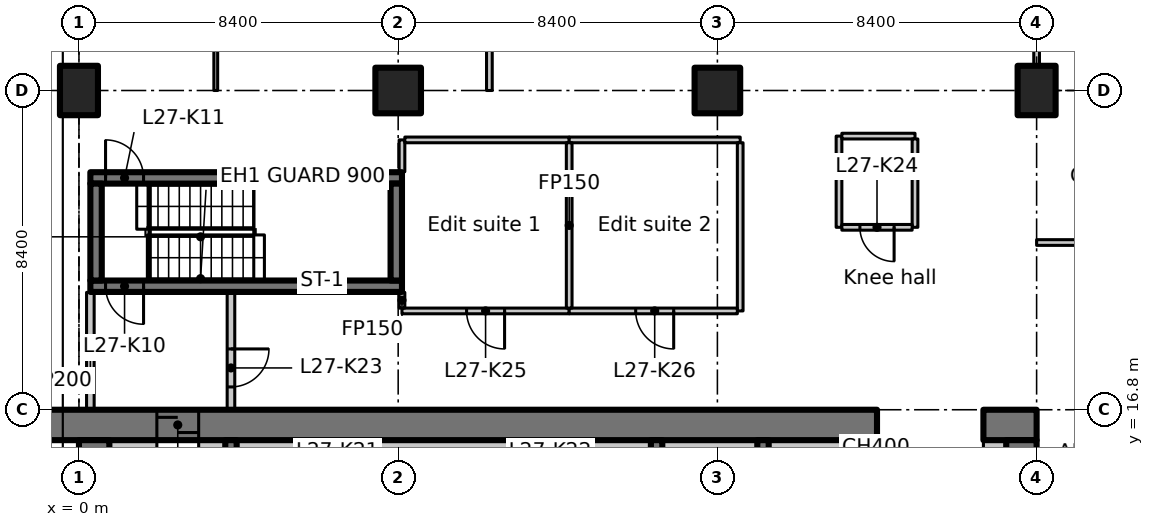
"""IFC4 building model, lengths in metres.
Left out: names, types, materials, properties, quantities, classifications, styles, units other than length and angle.
Written with IfcOpenShell. Run it as: python <this file> out.ifc"""

import sys

from ifc_helpers import new_model, si_unit, direction, frame, frame_2d, origin, origin_2d, place, context, subcontext, project, spatial, polyline, rectangle, outline, extrude, element, fill, save


model = new_model("IFC4")
c1 = context("Model", 3, precision=1e-05, world=origin(), true_north=direction((0.0, 1.0)))
c2 = subcontext(c1, "Body", "Model", "MODEL_VIEW")
j1 = project(units=[si_unit("LENGTHUNIT", "METRE"), si_unit("PLANEANGLEUNIT", "RADIAN")], contexts=[c1])
p1 = place(None, origin())
s1 = spatial("IfcSite", under=j1, at=p1, CompositionType="ELEMENT")
p2 = place(p1, origin())
s2 = spatial("IfcBuilding", under=s1, at=p2, CompositionType="ELEMENT")
p3 = place(p2, frame((0.0, 0.0, 113.3)))
s3 = spatial("IfcBuildingStorey", under=s2, at=p3, CompositionType="ELEMENT", Elevation=113.3)
p4 = place(p3, frame((0.0, 25.2, 0.0), z_axis=(0.0, 0.0, 1.0), x_axis=(1.0, 0.0, 0.0)))
e1 = element("IfcColumn", 1, at=p4, inside=s3, PredefinedType="COLUMN", context=c2, shape_type="SweptSolid", body=[
    extrude(rectangle(XDim=1.0, YDim=1.3, at=origin_2d()), origin(), (0.0, 0.0, 1.0), 3.35),
])
for number, where, z_axis, x_axis in (
    (2, (8.4, 25.2, 0.0), (0.0, 0.0, 1.0), (1.0, 0.0, 0.0)),
    (3, (16.8, 25.2, 0.0), (0.0, 0.0, 1.0), (1.0, 0.0, 0.0)),
):
    element("IfcColumn", number, at=place(p3, frame(where, z_axis=z_axis, x_axis=x_axis)), inside=s3, PredefinedType="COLUMN", context=c2, shape_type="SweptSolid", body=[
        extrude(rectangle(XDim=1.2, YDim=1.2, at=origin_2d()), origin(), (0.0, 0.0, 1.0), 3.35),
    ])
p5 = place(p3, frame((25.2, 25.2, 0.0), z_axis=(0.0, 0.0, 1.0), x_axis=(1.0, 0.0, 0.0)))
e4 = element("IfcColumn", 4, at=p5, inside=s3, PredefinedType="COLUMN", context=c2, shape_type="SweptSolid", body=[
    extrude(rectangle(XDim=1.0, YDim=1.3, at=origin_2d()), origin(), (0.0, 0.0, 1.0), 3.35),
])
p6 = place(p3, frame((-1.1, 16.4, 0.0), z_axis=(0.0, 0.0, 1.0), x_axis=(1.0, 0.0, 0.0)))
e5 = element("IfcWall", 5, at=p6, inside=s3, PredefinedType="SHEAR", context=c2, shape_type="SweptSolid", body=[
    extrude(rectangle(XDim=22.1, YDim=0.8, at=frame_2d((11.05, 0.0))), origin(), (0.0, 0.0, 1.0), 3.35),
])
p7 = place(p6, frame((3.15, 0.0, 0.0)))
e6 = element("IfcOpeningElement", 6, at=p7, cuts=e5, PredefinedType="OPENING", context=c2, shape_type="SweptSolid", body=[
    extrude(rectangle(XDim=1.1, YDim=2.3, at=frame_2d((0.55, 1.15))), frame((0.0, 0.41, 0.0), z_axis=(0.0, -1.0, 0.0), x_axis=(1.0, 0.0, 0.0)), (0.0, 0.0, 1.0), 0.82),
])
p8 = place(p3, frame((23.8, 16.4, 0.0), z_axis=(0.0, 0.0, 1.0), x_axis=(1.0, 0.0, 0.0)))
e7 = element("IfcWall", 7, at=p8, inside=s3, PredefinedType="SHEAR", context=c2, shape_type="SweptSolid", body=[
    extrude(rectangle(XDim=1.4, YDim=0.8, at=frame_2d((0.7, 0.0))), origin(), (0.0, 0.0, 1.0), 3.35),
])
p9 = place(p3, frame((0.4, 7.136, 0.0), z_axis=(0.0, 0.0, 1.0), x_axis=(0.0, 1.0, 0.0)))
e8 = element("IfcWall", 8, at=p9, inside=s3, PredefinedType="SHEAR", context=c2, shape_type="SweptSolid", body=[
    extrude(rectangle(XDim=8.864, YDim=0.8, at=frame_2d((4.432, 0.0))), origin(), (0.0, 0.0, 1.0), 3.35),
])
p10 = place(p3, frame((24.8, 12.6, 0.0), z_axis=(0.0, 0.0, 1.0), x_axis=(0.0, 1.0, 0.0)))
e9 = element("IfcWall", 9, at=p10, inside=s3, PredefinedType="SHEAR", context=c2, shape_type="SweptSolid", body=[
    extrude(rectangle(XDim=3.4, YDim=0.8, at=frame_2d((1.7, 0.0))), origin(), (0.0, 0.0, 1.0), 3.35),
])
p11 = place(p3, frame((0.8, 15.8, 0.0), z_axis=(0.0, 0.0, 1.0), x_axis=(1.0, 0.0, 0.0)))
e10 = element("IfcWall", 10, at=p11, inside=s3, PredefinedType="PARTITIONING", context=c2, shape_type="SweptSolid", body=[
    extrude(rectangle(XDim=1.25, YDim=0.4, at=frame_2d((0.625, 0.0))), origin(), (0.0, 0.0, 1.0), 3.35),
])
p12 = place(p3, frame((23.8, 15.8, 0.0), z_axis=(0.0, 0.0, 1.0), x_axis=(1.0, 0.0, 0.0)))
e11 = element("IfcWall", 11, at=p12, inside=s3, PredefinedType="PARTITIONING", context=c2, shape_type="SweptSolid", body=[
    extrude(rectangle(XDim=0.6, YDim=0.4, at=frame_2d((0.3, 0.0))), origin(), (0.0, 0.0, 1.0), 3.35),
])
for number, where, z_axis, x_axis in (
    (12, (4.0, 12.95, 0.0), (0.0, 0.0, 1.0), (0.0, 1.0, 0.0)),
    (13, (15.2, 12.95, 0.0), (0.0, 0.0, 1.0), (0.0, 1.0, 0.0)),
    (14, (18.0, 12.95, 0.0), (0.0, 0.0, 1.0), (0.0, 1.0, 0.0)),
    (15, (20.8, 12.95, 0.0), (0.0, 0.0, 1.0), (0.0, 1.0, 0.0)),
):
    element("IfcWall", number, at=place(p3, frame(where, z_axis=z_axis, x_axis=x_axis)), inside=s3, PredefinedType="SHEAR", context=c2, shape_type="SweptSolid", body=[
        extrude(rectangle(XDim=3.05, YDim=0.3, at=frame_2d((1.525, 0.0))), origin(), (0.0, 0.0, 1.0), 3.35),
    ])
p13 = place(p3, frame((8.5, 20.05, 0.0), z_axis=(0.0, 0.0, 1.0), x_axis=(-1.0, 0.0, 0.0)))
e16 = element("IfcWall", 16, at=p13, inside=s3, PredefinedType="SHEAR", context=c2, shape_type="SweptSolid", body=[
    extrude(rectangle(XDim=8.2, YDim=0.3, at=frame_2d((4.1, 0.0))), origin(), (0.0, 0.0, 1.0), 3.35),
])
p14 = place(p13, frame((6.8, 0.0, 0.0)))
e17 = element("IfcOpeningElement", 17, at=p14, cuts=e16, PredefinedType="OPENING", context=c2, shape_type="SweptSolid", body=[
    extrude(rectangle(XDim=1.0, YDim=2.1, at=frame_2d((0.5, 1.05))), frame((0.0, 0.16, 0.0), z_axis=(0.0, -1.0, 0.0), x_axis=(1.0, 0.0, 0.0)), (0.0, 0.0, 1.0), 0.32),
])
p15 = place(p3, frame((0.3, 22.9, 0.0), z_axis=(0.0, 0.0, 1.0), x_axis=(1.0, 0.0, 0.0)))
e18 = element("IfcWall", 18, at=p15, inside=s3, PredefinedType="SHEAR", context=c2, shape_type="SweptSolid", body=[
    extrude(rectangle(XDim=8.2, YDim=0.3, at=frame_2d((4.1, 0.0))), origin(), (0.0, 0.0, 1.0), 3.35),
])
p16 = place(p15, frame((0.4, 0.0, 0.0)))
e19 = element("IfcOpeningElement", 19, at=p16, cuts=e18, PredefinedType="OPENING", context=c2, shape_type="SweptSolid", body=[
    extrude(rectangle(XDim=1.0, YDim=2.1, at=frame_2d((0.5, 1.05))), frame((0.0, 0.16, 0.0), z_axis=(0.0, -1.0, 0.0), x_axis=(1.0, 0.0, 0.0)), (0.0, 0.0, 1.0), 0.32),
])
for number, where, z_axis, x_axis in (
    (20, (0.45, 20.2, 0.0), (0.0, 0.0, 1.0), (0.0, 1.0, 0.0)),
    (21, (8.35, 20.2, 0.0), (0.0, 0.0, 1.0), (0.0, 1.0, 0.0)),
):
    element("IfcWall", number, at=place(p3, frame(where, z_axis=z_axis, x_axis=x_axis)), inside=s3, PredefinedType="SHEAR", context=c2, shape_type="SweptSolid", body=[
        extrude(rectangle(XDim=2.55, YDim=0.3, at=frame_2d((1.275, 0.0))), origin(), (0.0, 0.0, 1.0), 3.35),
    ])
p17 = place(p3, frame((0.3, 16.812, 0.0), z_axis=(0.0, 0.0, 1.0), x_axis=(0.0, 1.0, 0.0)))
e22 = element("IfcWall", 22, at=p17, inside=s3, PredefinedType="PARTITIONING", context=c2, shape_type="SweptSolid", body=[
    extrude(rectangle(XDim=3.076, YDim=0.2, at=frame_2d((1.538, 0.0))), origin(), (0.0, 0.0, 1.0), 2.98),
])
p18 = place(p3, frame((4.0, 19.888, 0.0), z_axis=(0.0, 0.0, 1.0), x_axis=(0.0, -1.0, 0.0)))
e23 = element("IfcWall", 23, at=p18, inside=s3, PredefinedType="PARTITIONING", context=c2, shape_type="SweptSolid", body=[
    extrude(rectangle(XDim=3.076, YDim=0.2, at=frame_2d((1.538, 0.0))), origin(), (0.0, 0.0, 1.0), 3.35),
])
p19 = place(p18, frame((1.488, 0.0, 0.0)))
e24 = element("IfcOpeningElement", 24, at=p19, cuts=e23, PredefinedType="OPENING", context=c2, shape_type="SweptSolid", body=[
    extrude(rectangle(XDim=1.0, YDim=2.1, at=frame_2d((0.5, 1.05))), frame((0.0, 0.11, 0.0), z_axis=(0.0, -1.0, 0.0), x_axis=(1.0, 0.0, 0.0)), (0.0, 0.0, 1.0), 0.22),
])
p20 = place(p3, frame((12.9, 19.4, 0.0), z_axis=(0.0, 0.0, 1.0), x_axis=(-1.0, 0.0, 0.0)))
e25 = element("IfcWall", 25, at=p20, inside=s3, PredefinedType="PARTITIONING", context=c2, shape_type="SweptSolid", body=[
    extrude(rectangle(XDim=4.4, YDim=0.15, at=frame_2d((2.2, 0.0))), origin(), (0.0, 0.0, 1.0), 3.35),
])
p21 = place(p20, frame((1.7, 0.0, 0.0)))
e26 = element("IfcOpeningElement", 26, at=p21, cuts=e25, PredefinedType="OPENING", context=c2, shape_type="SweptSolid", body=[
    extrude(rectangle(XDim=1.0, YDim=2.1, at=frame_2d((0.5, 1.05))), frame((0.0, 0.085, 0.0), z_axis=(0.0, -1.0, 0.0), x_axis=(1.0, 0.0, 0.0)), (0.0, 0.0, 1.0), 0.17),
])
p22 = place(p3, frame((8.5, 19.475, 0.0), z_axis=(0.0, 0.0, 1.0), x_axis=(0.0, 1.0, 0.0)))
e27 = element("IfcWall", 27, at=p22, inside=s3, PredefinedType="PARTITIONING", context=c2, shape_type="SweptSolid", body=[
    extrude(rectangle(XDim=0.413, YDim=0.15, at=frame_2d((0.207, 0.0))), origin(), (0.0, 0.0, 1.0), 3.35),
])
p23 = place(p3, frame((8.5, 23.062, 0.0), z_axis=(0.0, 0.0, 1.0), x_axis=(0.0, 1.0, 0.0)))
e28 = element("IfcWall", 28, at=p23, inside=s3, PredefinedType="PARTITIONING", context=c2, shape_type="SweptSolid", body=[
    extrude(rectangle(XDim=0.838, YDim=0.15, at=frame_2d((0.419, 0.0))), origin(), (0.0, 0.0, 1.0), 3.35),
])
p24 = place(p3, frame((8.575, 23.9, 0.0), z_axis=(0.0, 0.0, 1.0), x_axis=(1.0, 0.0, 0.0)))
e29 = element("IfcWall", 29, at=p24, inside=s3, PredefinedType="PARTITIONING", context=c2, shape_type="SweptSolid", body=[
    extrude(rectangle(XDim=4.325, YDim=0.15, at=frame_2d((2.163, 0.0))), origin(), (0.0, 0.0, 1.0), 3.35),
])
p25 = place(p3, frame((12.9, 23.9, 0.0), z_axis=(0.0, 0.0, 1.0), x_axis=(1.0, 0.0, 0.0)))
e30 = element("IfcWall", 30, at=p25, inside=s3, PredefinedType="PARTITIONING", context=c2, shape_type="SweptSolid", body=[
    extrude(rectangle(XDim=4.5, YDim=0.15, at=frame_2d((2.25, 0.0))), origin(), (0.0, 0.0, 1.0), 3.35),
])
p26 = place(p3, frame((17.4, 23.825, 0.0), z_axis=(0.0, 0.0, 1.0), x_axis=(0.0, -1.0, 0.0)))
e31 = element("IfcWall", 31, at=p26, inside=s3, PredefinedType="PARTITIONING", context=c2, shape_type="SweptSolid", body=[
    extrude(rectangle(XDim=4.425, YDim=0.15, at=frame_2d((2.212, 0.0))), origin(), (0.0, 0.0, 1.0), 3.35),
])
p27 = place(p3, frame((17.325, 19.4, 0.0), z_axis=(0.0, 0.0, 1.0), x_axis=(-1.0, 0.0, 0.0)))
e32 = element("IfcWall", 32, at=p27, inside=s3, PredefinedType="PARTITIONING", context=c2, shape_type="SweptSolid", body=[
    extrude(rectangle(XDim=4.425, YDim=0.15, at=frame_2d((2.212, 0.0))), origin(), (0.0, 0.0, 1.0), 3.35),
])
p28 = place(p27, frame((1.675, 0.0, 0.0)))
e33 = element("IfcOpeningElement", 33, at=p28, cuts=e32, PredefinedType="OPENING", context=c2, shape_type="SweptSolid", body=[
    extrude(rectangle(XDim=1.0, YDim=2.1, at=frame_2d((0.5, 1.05))), frame((0.0, 0.085, 0.0), z_axis=(0.0, -1.0, 0.0), x_axis=(1.0, 0.0, 0.0)), (0.0, 0.0, 1.0), 0.17),
])
p29 = place(p3, frame((12.9, 23.825, 0.0), z_axis=(0.0, 0.0, 1.0), x_axis=(0.0, -1.0, 0.0)))
e34 = element("IfcWall", 34, at=p29, inside=s3, PredefinedType="PARTITIONING", context=c2, shape_type="SweptSolid", body=[
    extrude(rectangle(XDim=4.35, YDim=0.15, at=frame_2d((2.175, 0.0))), origin(), (0.0, 0.0, 1.0), 3.35),
])
p30 = place(p3, frame((20.0, 21.6, 0.0), z_axis=(0.0, 0.0, 1.0), x_axis=(0.0, 1.0, 0.0)))
e35 = element("IfcWall", 35, at=p30, inside=s3, PredefinedType="PARTITIONING", context=c2, shape_type="SweptSolid", body=[
    extrude(rectangle(XDim=2.4, YDim=0.15, at=frame_2d((1.2, 0.0))), origin(), (0.0, 0.0, 1.0), 3.35),
])
p31 = place(p3, frame((20.075, 24.0, 0.0), z_axis=(0.0, 0.0, 1.0), x_axis=(1.0, 0.0, 0.0)))
e36 = element("IfcWall", 36, at=p31, inside=s3, PredefinedType="PARTITIONING", context=c2, shape_type="SweptSolid", body=[
    extrude(rectangle(XDim=1.925, YDim=0.15, at=frame_2d((0.962, 0.0))), origin(), (0.0, 0.0, 1.0), 3.35),
])
p32 = place(p3, frame((22.0, 23.925, 0.0), z_axis=(0.0, 0.0, 1.0), x_axis=(0.0, -1.0, 0.0)))
e37 = element("IfcWall", 37, at=p32, inside=s3, PredefinedType="PARTITIONING", context=c2, shape_type="SweptSolid", body=[
    extrude(rectangle(XDim=2.325, YDim=0.15, at=frame_2d((1.163, 0.0))), origin(), (0.0, 0.0, 1.0), 3.35),
])
p33 = place(p3, frame((21.925, 21.6, 0.0), z_axis=(0.0, 0.0, 1.0), x_axis=(-1.0, 0.0, 0.0)))
e38 = element("IfcWall", 38, at=p33, inside=s3, PredefinedType="PARTITIONING", context=c2, shape_type="SweptSolid", body=[
    extrude(rectangle(XDim=1.85, YDim=0.15, at=frame_2d((0.925, 0.0))), origin(), (0.0, 0.0, 1.0), 3.35),
])
p34 = place(p33, frame((0.475, 0.0, 0.0)))
e39 = element("IfcOpeningElement", 39, at=p34, cuts=e38, PredefinedType="OPENING", context=c2, shape_type="SweptSolid", body=[
    extrude(rectangle(XDim=0.9, YDim=2.1, at=frame_2d((0.45, 1.05))), frame((0.0, 0.085, 0.0), z_axis=(0.0, -1.0, 0.0), x_axis=(1.0, 0.0, 0.0)), (0.0, 0.0, 1.0), 0.17),
])
p35 = place(p3, frame((3.15, 15.8, 0.0), z_axis=(0.0, 0.0, 1.0), x_axis=(1.0, 0.0, 0.0)))
e40 = element("IfcWall", 40, at=p35, inside=s3, PredefinedType="PARTITIONING", context=c2, shape_type="SweptSolid", body=[
    extrude(rectangle(XDim=0.7, YDim=0.4, at=frame_2d((0.35, 0.0))), origin(), (0.0, 0.0, 1.0), 3.35),
])
p36 = place(p3, frame((4.15, 15.8, 0.0), z_axis=(0.0, 0.0, 1.0), x_axis=(1.0, 0.0, 0.0)))
e41 = element("IfcWall", 41, at=p36, inside=s3, PredefinedType="PARTITIONING", context=c2, shape_type="SweptSolid", body=[
    extrude(rectangle(XDim=10.9, YDim=0.4, at=frame_2d((5.45, 0.0))), origin(), (0.0, 0.0, 1.0), 3.35),
])
for number, where, z_axis, x_axis in (
    (42, (15.35, 15.8, 0.0), (0.0, 0.0, 1.0), (1.0, 0.0, 0.0)),
    (43, (18.15, 15.8, 0.0), (0.0, 0.0, 1.0), (1.0, 0.0, 0.0)),
):
    element("IfcWall", number, at=place(p3, frame(where, z_axis=z_axis, x_axis=x_axis)), inside=s3, PredefinedType="PARTITIONING", context=c2, shape_type="SweptSolid", body=[
        extrude(rectangle(XDim=2.5, YDim=0.4, at=frame_2d((1.25, 0.0))), origin(), (0.0, 0.0, 1.0), 3.35),
    ])
p37 = place(p3, frame((20.95, 15.8, 0.0), z_axis=(0.0, 0.0, 1.0), x_axis=(1.0, 0.0, 0.0)))
e44 = element("IfcWall", 44, at=p37, inside=s3, PredefinedType="PARTITIONING", context=c2, shape_type="SweptSolid", body=[
    extrude(rectangle(XDim=0.05, YDim=0.4, at=frame_2d((0.025, 0.0))), origin(), (0.0, 0.0, 1.0), 3.35),
])
p38 = place(p3, frame((25.2, 21.2, 0.0), z_axis=(0.0, 0.0, 1.0), x_axis=(1.0, 0.0, 0.0)))
e45 = element("IfcWall", 45, at=p38, inside=s3, PredefinedType="PARTITIONING", context=c2, shape_type="SweptSolid", body=[
    extrude(rectangle(XDim=4.2, YDim=0.15, at=frame_2d((2.1, 0.0))), origin(), (0.0, 0.0, 1.0), 3.33),
])
p39 = place(p3, frame((25.2, 31.0, 0.0), z_axis=(0.0, 0.0, 1.0), x_axis=(0.0, -1.0, 0.0)))
e46 = element("IfcWall", 46, at=p39, inside=s3, PredefinedType="PARTITIONING", context=c2, shape_type="SweptSolid", body=[
    extrude(outline(polyline([(0.0, 0.0), (5.13, 0.0), (5.13, 2.98), (0.0, 2.98), (0.0, 0.0)])), frame((0.0, 0.075, 0.0), z_axis=(0.0, -1.0, 0.0), x_axis=(1.0, 0.0, 0.0)), (0.0, 0.0, 1.0), 0.15),
])
p40 = place(p39, frame((1.93, 0.0, 0.0)))
e47 = element("IfcOpeningElement", 47, at=p40, cuts=e46, PredefinedType="OPENING", context=c2, shape_type="SweptSolid", body=[
    extrude(rectangle(XDim=1.1, YDim=2.1, at=frame_2d((0.55, 1.05))), frame((0.0, 0.085, 0.0), z_axis=(0.0, -1.0, 0.0), x_axis=(1.0, 0.0, 0.0)), (0.0, 0.0, 1.0), 0.17),
])
p41 = place(p3, frame((10.8, 25.2, 0.0), z_axis=(0.0, 0.0, 1.0), x_axis=(0.0, 1.0, 0.0)))
e48 = element("IfcWall", 48, at=p41, inside=s3, PredefinedType="PARTITIONING", context=c2, shape_type="SweptSolid", body=[
    extrude(rectangle(XDim=4.2, YDim=0.15, at=frame_2d((2.1, 0.0))), origin(), (0.0, 0.0, 1.0), 3.33),
])
p42 = place(p3, frame((3.6, 29.4, 0.0), z_axis=(0.0, 0.0, 1.0), x_axis=(0.0, -1.0, 0.0)))
e49 = element("IfcWall", 49, at=p42, inside=s3, PredefinedType="PARTITIONING", context=c2, shape_type="SweptSolid", body=[
    extrude(rectangle(XDim=4.2, YDim=0.1, at=frame_2d((2.1, 0.0))), origin(), (0.0, 0.0, 1.0), 3.33),
])
p43 = place(p7, origin())
e50 = element("IfcDoor", 50, at=p43, inside=s3, OperationType="SLIDING_TO_LEFT", PredefinedType="DOOR", context=c2, shape_type="SweptSolid", body=[
    extrude(rectangle(XDim=1.1, YDim=2.3, at=frame_2d((0.55, 1.15))), frame((0.0, 0.025, 0.0), z_axis=(0.0, -1.0, 0.0), x_axis=(1.0, 0.0, 0.0)), (0.0, 0.0, 1.0), 0.05),
])
fill(e6, e50)
p44 = place(p14, origin())
e51 = element("IfcDoor", 51, at=p44, inside=s3, OperationType="SINGLE_SWING_LEFT", PredefinedType="DOOR", context=c2, shape_type="SweptSolid", body=[
    extrude(rectangle(XDim=1.0, YDim=2.1, at=frame_2d((0.5, 1.05))), frame((0.0, 0.025, 0.0), z_axis=(0.0, -1.0, 0.0), x_axis=(1.0, 0.0, 0.0)), (0.0, 0.0, 1.0), 0.05),
])
fill(e17, e51)
p45 = place(p16, origin())
e52 = element("IfcDoor", 52, at=p45, inside=s3, OperationType="SINGLE_SWING_RIGHT", PredefinedType="DOOR", context=c2, shape_type="SweptSolid", body=[
    extrude(rectangle(XDim=1.0, YDim=2.1, at=frame_2d((0.5, 1.05))), frame((0.0, 0.025, 0.0), z_axis=(0.0, -1.0, 0.0), x_axis=(1.0, 0.0, 0.0)), (0.0, 0.0, 1.0), 0.05),
])
fill(e19, e52)
p46 = place(p19, origin())
e53 = element("IfcDoor", 53, at=p46, inside=s3, OperationType="SINGLE_SWING_RIGHT", PredefinedType="DOOR", context=c2, shape_type="SweptSolid", body=[
    extrude(rectangle(XDim=1.0, YDim=2.1, at=frame_2d((0.5, 1.05))), frame((0.0, 0.025, 0.0), z_axis=(0.0, -1.0, 0.0), x_axis=(1.0, 0.0, 0.0)), (0.0, 0.0, 1.0), 0.05),
])
fill(e24, e53)
p47 = place(p34, origin())
e54 = element("IfcDoor", 54, at=p47, inside=s3, OperationType="SINGLE_SWING_LEFT", PredefinedType="DOOR", context=c2, shape_type="SweptSolid", body=[
    extrude(rectangle(XDim=0.9, YDim=2.1, at=frame_2d((0.45, 1.05))), frame((0.0, 0.025, 0.0), z_axis=(0.0, -1.0, 0.0), x_axis=(1.0, 0.0, 0.0)), (0.0, 0.0, 1.0), 0.05),
])
fill(e39, e54)
p48 = place(p21, origin())
e55 = element("IfcDoor", 55, at=p48, inside=s3, OperationType="SINGLE_SWING_RIGHT", PredefinedType="DOOR", context=c2, shape_type="SweptSolid", body=[
    extrude(rectangle(XDim=1.0, YDim=2.1, at=frame_2d((0.5, 1.05))), frame((0.0, 0.025, 0.0), z_axis=(0.0, -1.0, 0.0), x_axis=(1.0, 0.0, 0.0)), (0.0, 0.0, 1.0), 0.05),
])
fill(e26, e55)
p49 = place(p28, origin())
e56 = element("IfcDoor", 56, at=p49, inside=s3, OperationType="SINGLE_SWING_LEFT", PredefinedType="DOOR", context=c2, shape_type="SweptSolid", body=[
    extrude(rectangle(XDim=1.0, YDim=2.1, at=frame_2d((0.5, 1.05))), frame((0.0, 0.025, 0.0), z_axis=(0.0, -1.0, 0.0), x_axis=(1.0, 0.0, 0.0)), (0.0, 0.0, 1.0), 0.05),
])
fill(e33, e56)
save(model, sys.argv[1])
